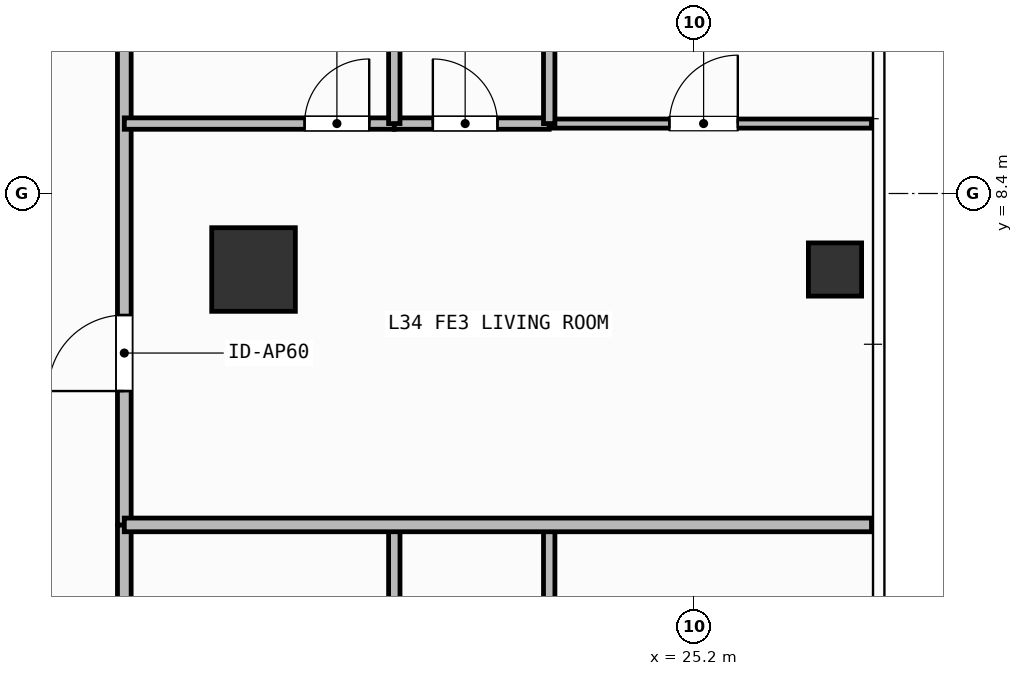
"""IFC4 building model, lengths in metres.
Left out: names, types, materials, properties, quantities, classifications, styles, units other than length and angle.
Written with IfcOpenShell. Run it as: python <this file> out.ifc"""

import sys

from ifc_helpers import new_model, si_unit, direction, frame, frame_2d, origin, origin_2d, place, context, subcontext, project, spatial, rectangle, hollow_rectangle, extrude, element, fill, save


model = new_model("IFC4")
c1 = context("Model", 3, precision=1e-05, world=origin(), true_north=direction((0.0, 1.0)))
c2 = subcontext(c1, "Body", "Model", "MODEL_VIEW")
j1 = project(units=[si_unit("LENGTHUNIT", "METRE"), si_unit("PLANEANGLEUNIT", "RADIAN")], contexts=[c1])
p1 = place(None, origin())
s1 = spatial("IfcSite", under=j1, at=p1, CompositionType="ELEMENT")
p2 = place(p1, origin())
s2 = spatial("IfcBuilding", under=s1, at=p2, CompositionType="ELEMENT")
p3 = place(p2, frame((0.0, 0.0, 136.8)))
s3 = spatial("IfcBuildingStorey", under=s2, at=p3, CompositionType="ELEMENT", Elevation=136.8)
p4 = place(p3, frame((19.4, 7.4, 0.0), z_axis=(0.0, 0.0, 1.0), x_axis=(1.0, 0.0, 0.0)))
e1 = element("IfcColumn", 1, at=p4, inside=s3, PredefinedType="COLUMN", context=c2, shape_type="SweptSolid", body=[
    extrude(rectangle(XDim=1.1, YDim=1.1, at=origin_2d()), origin(), (0.0, 0.0, 1.0), 3.9),
])
p5 = place(p3, frame((27.05, 7.4, 0.0), z_axis=(0.0, 0.0, 1.0), x_axis=(1.0, 0.0, 0.0)))
e2 = element("IfcColumn", 2, at=p5, inside=s3, PredefinedType="COLUMN", context=c2, shape_type="SweptSolid", body=[
    extrude(hollow_rectangle(XDim=0.7, YDim=0.7, WallThickness=0.032, at=origin_2d()), origin(), (0.0, 0.0, 1.0), 3.9),
])
p6 = place(p3, frame((17.7, -5.058, 0.0), z_axis=(0.0, 0.0, 1.0), x_axis=(0.0, 1.0, 0.0)))
e3 = element("IfcWall", 3, at=p6, inside=s3, PredefinedType="PARTITIONING", context=c2, shape_type="SweptSolid", body=[
    extrude(rectangle(XDim=9.098, YDim=0.18, at=frame_2d((4.549, 0.0))), origin(), (0.0, 0.0, 1.0), 3.68),
])
p7 = place(p6, frame((1.928, 0.0, 0.0)))
e4 = element("IfcOpeningElement", 4, at=p7, cuts=e3, PredefinedType="OPENING", context=c2, shape_type="SweptSolid", body=[
    extrude(rectangle(XDim=1.0, YDim=2.2, at=frame_2d((0.5, 1.1))), frame((0.0, 0.1, 0.0), z_axis=(0.0, -1.0, 0.0), x_axis=(1.0, 0.0, 0.0)), (0.0, 0.0, 1.0), 0.2),
])
p8 = place(p3, frame((17.7, 4.04, 0.0), z_axis=(0.0, 0.0, 1.0), x_axis=(0.0, 1.0, 0.0)))
e5 = element("IfcWall", 5, at=p8, inside=s3, PredefinedType="PARTITIONING", context=c2, shape_type="SweptSolid", body=[
    extrude(rectangle(XDim=8.08, YDim=0.18, at=frame_2d((4.04, 0.0))), origin(), (0.0, 0.0, 1.0), 3.68),
])
p9 = place(p8, frame((1.761, 0.0, 0.0)))
e6 = element("IfcOpeningElement", 6, at=p9, cuts=e5, PredefinedType="OPENING", context=c2, shape_type="SweptSolid", body=[
    extrude(rectangle(XDim=1.0, YDim=2.2, at=frame_2d((0.5, 1.1))), frame((0.0, 0.1, 0.0), z_axis=(0.0, -1.0, 0.0), x_axis=(1.0, 0.0, 0.0)), (0.0, 0.0, 1.0), 0.2),
])
p10 = place(p3, frame((17.7, 9.32, 0.0), z_axis=(0.0, 0.0, 1.0), x_axis=(1.0, 0.0, 0.0)))
e7 = element("IfcWall", 7, at=p10, inside=s3, PredefinedType="PARTITIONING", context=c2, shape_type="SweptSolid", body=[
    extrude(rectangle(XDim=3.552, YDim=0.15, at=frame_2d((1.776, 0.0))), origin(), (0.0, 0.0, 1.0), 3.68),
])
p11 = place(p10, frame((2.372, 0.0, 0.0)))
e8 = element("IfcOpeningElement", 8, at=p11, cuts=e7, PredefinedType="OPENING", context=c2, shape_type="SweptSolid", body=[
    extrude(rectangle(XDim=0.85, YDim=2.1, at=frame_2d((0.425, 1.05))), frame((0.0, 0.085, 0.0), z_axis=(0.0, -1.0, 0.0), x_axis=(1.0, 0.0, 0.0)), (0.0, 0.0, 1.0), 0.17),
])
p12 = place(p3, frame((21.252, 9.32, 0.0), z_axis=(0.0, 0.0, 1.0), x_axis=(1.0, 0.0, 0.0)))
e9 = element("IfcWall", 9, at=p12, inside=s3, PredefinedType="PARTITIONING", context=c2, shape_type="SweptSolid", body=[
    extrude(rectangle(XDim=2.038, YDim=0.15, at=frame_2d((1.019, 0.0))), origin(), (0.0, 0.0, 1.0), 3.68),
])
p13 = place(p12, frame((0.507, 0.0, 0.0)))
e10 = element("IfcOpeningElement", 10, at=p13, cuts=e9, PredefinedType="OPENING", context=c2, shape_type="SweptSolid", body=[
    extrude(rectangle(XDim=0.85, YDim=2.1, at=frame_2d((0.425, 1.05))), frame((0.0, 0.085, 0.0), z_axis=(0.0, -1.0, 0.0), x_axis=(1.0, 0.0, 0.0)), (0.0, 0.0, 1.0), 0.17),
])
p14 = place(p3, frame((23.29, 9.32, 0.0), z_axis=(0.0, 0.0, 1.0), x_axis=(1.0, 0.0, 0.0)))
e11 = element("IfcWall", 11, at=p14, inside=s3, PredefinedType="PARTITIONING", context=c2, shape_type="SweptSolid", body=[
    extrude(rectangle(XDim=4.24, YDim=0.12, at=frame_2d((2.12, 0.0))), origin(), (0.0, 0.0, 1.0), 3.68),
])
p15 = place(p14, frame((1.581, 0.0, 0.0)))
e12 = element("IfcOpeningElement", 12, at=p15, cuts=e11, PredefinedType="OPENING", context=c2, shape_type="SweptSolid", body=[
    extrude(rectangle(XDim=0.9, YDim=2.1, at=frame_2d((0.45, 1.05))), frame((0.0, 0.07, 0.0), z_axis=(0.0, -1.0, 0.0), x_axis=(1.0, 0.0, 0.0)), (0.0, 0.0, 1.0), 0.14),
])
for number, where, z_axis, x_axis in (
    (13, (21.252, -0.873, 0.0), (0.0, 0.0, 1.0), (0.0, 1.0, 0.0)),
    (14, (23.29, -0.873, 0.0), (0.0, 0.0, 1.0), (0.0, 1.0, 0.0)),
):
    element("IfcWall", number, at=place(p3, frame(where, z_axis=z_axis, x_axis=x_axis)), inside=s3, PredefinedType="PARTITIONING", context=c2, shape_type="SweptSolid", body=[
        extrude(rectangle(XDim=4.913, YDim=0.15, at=frame_2d((2.457, 0.0))), origin(), (0.0, 0.0, 1.0), 3.68),
    ])
for number, where, z_axis, x_axis in (
    (15, (21.252, 9.32, 0.0), (0.0, 0.0, 1.0), (0.0, 1.0, 0.0)),
    (16, (23.29, 9.32, 0.0), (0.0, 0.0, 1.0), (0.0, 1.0, 0.0)),
):
    element("IfcWall", number, at=place(p3, frame(where, z_axis=z_axis, x_axis=x_axis)), inside=s3, PredefinedType="PARTITIONING", context=c2, shape_type="SweptSolid", body=[
        extrude(rectangle(XDim=2.8, YDim=0.15, at=frame_2d((1.4, 0.0))), origin(), (0.0, 0.0, 1.0), 3.68),
    ])
p16 = place(p3, frame((17.7, 4.04, 0.0), z_axis=(0.0, 0.0, 1.0), x_axis=(1.0, 0.0, 0.0)))
e17 = element("IfcWall", 17, at=p16, inside=s3, PredefinedType="PARTITIONING", context=c2, shape_type="SweptSolid", body=[
    extrude(rectangle(XDim=9.83, YDim=0.18, at=frame_2d((4.915, 0.0))), origin(), (0.0, 0.0, 1.0), 3.68),
])
p17 = place(p9, origin())
e18 = element("IfcDoor", 18, at=p17, inside=s3, OperationType="SINGLE_SWING_LEFT", PredefinedType="DOOR", context=c2, shape_type="SweptSolid", body=[
    extrude(rectangle(XDim=1.0, YDim=2.2, at=frame_2d((0.5, 1.1))), frame((0.0, 0.025, 0.0), z_axis=(0.0, -1.0, 0.0), x_axis=(1.0, 0.0, 0.0)), (0.0, 0.0, 1.0), 0.05),
])
fill(e6, e18)
p18 = place(p11, origin())
e19 = element("IfcDoor", 19, at=p18, inside=s3, OperationType="SINGLE_SWING_RIGHT", PredefinedType="DOOR", context=c2, shape_type="SweptSolid", body=[
    extrude(rectangle(XDim=0.85, YDim=2.1, at=frame_2d((0.425, 1.05))), frame((0.0, 0.025, 0.0), z_axis=(0.0, -1.0, 0.0), x_axis=(1.0, 0.0, 0.0)), (0.0, 0.0, 1.0), 0.05),
])
fill(e8, e19)
p19 = place(p13, origin())
e20 = element("IfcDoor", 20, at=p19, inside=s3, OperationType="SINGLE_SWING_LEFT", PredefinedType="DOOR", context=c2, shape_type="SweptSolid", body=[
    extrude(rectangle(XDim=0.85, YDim=2.1, at=frame_2d((0.425, 1.05))), frame((0.0, 0.025, 0.0), z_axis=(0.0, -1.0, 0.0), x_axis=(1.0, 0.0, 0.0)), (0.0, 0.0, 1.0), 0.05),
])
fill(e10, e20)
p20 = place(p15, origin())
e21 = element("IfcDoor", 21, at=p20, inside=s3, OperationType="SINGLE_SWING_RIGHT", PredefinedType="DOOR", context=c2, shape_type="SweptSolid", body=[
    extrude(rectangle(XDim=0.9, YDim=2.1, at=frame_2d((0.45, 1.05))), frame((0.0, 0.025, 0.0), z_axis=(0.0, -1.0, 0.0), x_axis=(1.0, 0.0, 0.0)), (0.0, 0.0, 1.0), 0.05),
])
fill(e12, e21)
save(model, sys.argv[1])
